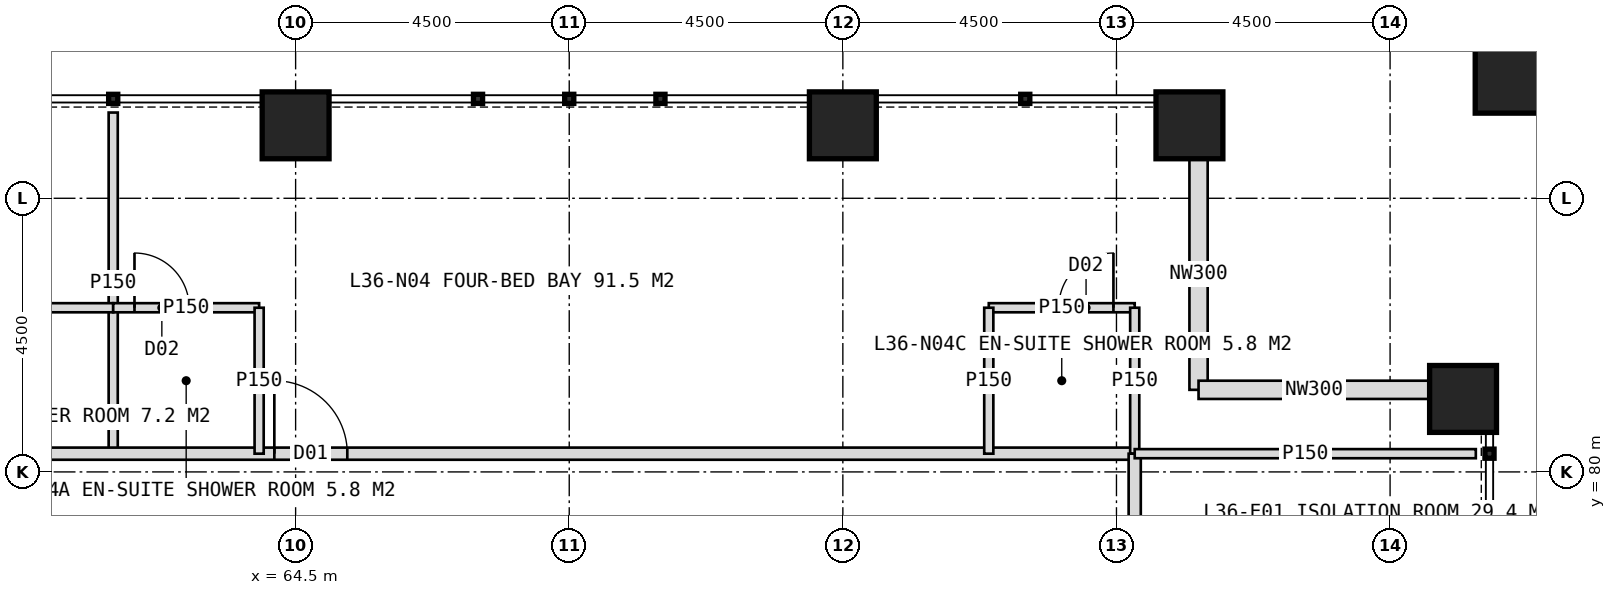
"""IFC4 building model, lengths in metres.
Left out: names, types, materials, properties, quantities, classifications, styles, units other than length and angle.
Written with IfcOpenShell. Run it as: python <this file> out.ifc"""

import sys

from ifc_helpers import new_model, si_unit, direction, frame, frame_2d, origin, origin_2d, place, context, subcontext, project, spatial, rectangle, hollow_rectangle, extrude, element, fill, save


model = new_model("IFC4")
c1 = context("Model", 3, precision=1e-05, world=origin(), true_north=direction((0.0, 1.0)))
c2 = subcontext(c1, "Body", "Model", "MODEL_VIEW")
j1 = project(units=[si_unit("LENGTHUNIT", "METRE"), si_unit("PLANEANGLEUNIT", "RADIAN")], contexts=[c1])
p1 = place(None, origin())
s1 = spatial("IfcSite", under=j1, at=p1, CompositionType="ELEMENT")
p2 = place(p1, origin())
s2 = spatial("IfcBuilding", under=s1, at=p2, CompositionType="ELEMENT")
p3 = place(p2, frame((0.0, 0.0, 152.0)))
s3 = spatial("IfcBuildingStorey", under=s2, at=p3, CompositionType="ELEMENT", Elevation=152.0)
for number, where, z_axis, x_axis in (
    (1, (64.5, 85.7, 0.0), (0.0, 0.0, 1.0), (1.0, 0.0, 0.0)),
    (2, (73.5, 85.7, 0.0), (0.0, 0.0, 1.0), (1.0, 0.0, 0.0)),
    (3, (79.2, 85.7, 0.0), (0.0, 0.0, 1.0), (1.0, 0.0, 0.0)),
    (4, (83.7, 81.2, 0.0), (0.0, 0.0, 1.0), (1.0, 0.0, 0.0)),
):
    element("IfcColumn", number, at=place(p3, frame(where, z_axis=z_axis, x_axis=x_axis)), inside=s3, PredefinedType="COLUMN", context=c2, shape_type="SweptSolid", body=[
        extrude(hollow_rectangle(XDim=1.1, YDim=1.1, WallThickness=0.1, at=origin_2d()), origin(), (0.0, 0.0, 1.0), 4.0),
    ])
p4 = place(p3, frame((84.6, 86.6, 0.0), z_axis=(0.0, 0.0, 1.0), x_axis=(1.0, 0.0, 0.0)))
e5 = element("IfcColumn", 5, at=p4, inside=s3, PredefinedType="COLUMN", context=c2, shape_type="SweptSolid", body=[
    extrude(hollow_rectangle(XDim=1.4, YDim=1.4, WallThickness=0.08, at=origin_2d()), origin(), (0.0, 0.0, 1.0), 4.0),
])
for number, where, z_axis, x_axis in (
    (6, (79.35, 85.15, 0.0), (0.0, 0.0, 1.0), (0.0, -1.0, 0.0)),
    (7, (79.35, 81.35, 0.0), (0.0, 0.0, 1.0), (1.0, 0.0, 0.0)),
):
    element("IfcWall", number, at=place(p3, frame(where, z_axis=z_axis, x_axis=x_axis)), inside=s3, PredefinedType="ELEMENTEDWALL", context=c2, shape_type="SweptSolid", body=[
        extrude(rectangle(XDim=3.8, YDim=0.3, at=frame_2d((1.9, 0.0))), origin(), (0.0, 0.0, 1.0), 4.0),
    ])
p5 = place(p3, frame((61.5, 80.3, 0.0), z_axis=(0.0, 0.0, 1.0), x_axis=(0.0, 1.0, 0.0)))
e8 = element("IfcWall", 8, at=p5, inside=s3, PredefinedType="PARTITIONING", context=c2, shape_type="SweptSolid", body=[
    extrude(rectangle(XDim=5.61, YDim=0.15, at=frame_2d((2.805, 0.0))), origin(), (0.0, 0.0, 1.0), 3.75),
])
p6 = place(p3, frame((41.7, 80.3, 0.0), z_axis=(0.0, 0.0, 1.0), x_axis=(1.0, 0.0, 0.0)))
e9 = element("IfcWall", 9, at=p6, inside=s3, PredefinedType="PARTITIONING", context=c2, shape_type="SweptSolid", body=[
    extrude(rectangle(XDim=36.6, YDim=0.2, at=frame_2d((18.3, 0.0))), origin(), (0.0, 0.0, 1.0), 3.75),
])
p7 = place(p6, frame((3.35, 0.0, 0.0)))
e10 = element("IfcOpeningElement", 10, at=p7, cuts=e9, PredefinedType="OPENING", context=c2, shape_type="SweptSolid", body=[
    extrude(rectangle(XDim=1.2, YDim=2.2, at=frame_2d((0.6, 1.1))), frame((0.0, 0.11, 0.0), z_axis=(0.0, -1.0, 0.0), x_axis=(1.0, 0.0, 0.0)), (0.0, 0.0, 1.0), 0.22),
])
p8 = place(p6, frame((8.8, 0.0, 0.0)))
e11 = element("IfcOpeningElement", 11, at=p8, cuts=e9, PredefinedType="OPENING", context=c2, shape_type="SweptSolid", body=[
    extrude(rectangle(XDim=1.0, YDim=2.1, at=frame_2d((0.5, 1.05))), frame((0.0, 0.11, 0.0), z_axis=(0.0, -1.0, 0.0), x_axis=(1.0, 0.0, 0.0)), (0.0, 0.0, 1.0), 0.22),
])
p9 = place(p6, frame((15.35, 0.0, 0.0)))
e12 = element("IfcOpeningElement", 12, at=p9, cuts=e9, PredefinedType="OPENING", context=c2, shape_type="SweptSolid", body=[
    extrude(rectangle(XDim=1.2, YDim=2.2, at=frame_2d((0.6, 1.1))), frame((0.0, 0.11, 0.0), z_axis=(0.0, -1.0, 0.0), x_axis=(1.0, 0.0, 0.0)), (0.0, 0.0, 1.0), 0.22),
])
p10 = place(p6, frame((22.45, 0.0, 0.0)))
e13 = element("IfcOpeningElement", 13, at=p10, cuts=e9, PredefinedType="OPENING", context=c2, shape_type="SweptSolid", body=[
    extrude(rectangle(XDim=1.2, YDim=2.2, at=frame_2d((0.6, 1.1))), frame((0.0, 0.11, 0.0), z_axis=(0.0, -1.0, 0.0), x_axis=(1.0, 0.0, 0.0)), (0.0, 0.0, 1.0), 0.22),
])
p11 = place(p3, frame((58.5, 82.7, 0.0), z_axis=(0.0, 0.0, 1.0), x_axis=(1.0, 0.0, 0.0)))
e14 = element("IfcWall", 14, at=p11, inside=s3, PredefinedType="PARTITIONING", context=c2, shape_type="SweptSolid", body=[
    extrude(rectangle(XDim=3.0, YDim=0.15, at=frame_2d((1.5, 0.0))), origin(), (0.0, 0.0, 1.0), 3.75),
])
p12 = place(p11, frame((0.35, 0.0, 0.0)))
e15 = element("IfcOpeningElement", 15, at=p12, cuts=e14, PredefinedType="OPENING", context=c2, shape_type="SweptSolid", body=[
    extrude(rectangle(XDim=0.9, YDim=2.1, at=frame_2d((0.45, 1.05))), frame((0.0, 0.085, 0.0), z_axis=(0.0, -1.0, 0.0), x_axis=(1.0, 0.0, 0.0)), (0.0, 0.0, 1.0), 0.17),
])
p13 = place(p3, frame((61.5, 82.7, 0.0), z_axis=(0.0, 0.0, 1.0), x_axis=(1.0, 0.0, 0.0)))
e16 = element("IfcWall", 16, at=p13, inside=s3, PredefinedType="PARTITIONING", context=c2, shape_type="SweptSolid", body=[
    extrude(rectangle(XDim=2.4, YDim=0.15, at=frame_2d((1.2, 0.0))), origin(), (0.0, 0.0, 1.0), 3.75),
])
p14 = place(p13, frame((0.35, 0.0, 0.0)))
e17 = element("IfcOpeningElement", 17, at=p14, cuts=e16, PredefinedType="OPENING", context=c2, shape_type="SweptSolid", body=[
    extrude(rectangle(XDim=0.9, YDim=2.1, at=frame_2d((0.45, 1.05))), frame((0.0, 0.085, 0.0), z_axis=(0.0, -1.0, 0.0), x_axis=(1.0, 0.0, 0.0)), (0.0, 0.0, 1.0), 0.17),
])
p15 = place(p3, frame((63.9, 80.3, 0.0), z_axis=(0.0, 0.0, 1.0), x_axis=(0.0, 1.0, 0.0)))
e18 = element("IfcWall", 18, at=p15, inside=s3, PredefinedType="PARTITIONING", context=c2, shape_type="SweptSolid", body=[
    extrude(rectangle(XDim=2.4, YDim=0.15, at=frame_2d((1.2, 0.0))), origin(), (0.0, 0.0, 1.0), 3.75),
])
p16 = place(p3, frame((75.9, 82.7, 0.0), z_axis=(0.0, 0.0, 1.0), x_axis=(1.0, 0.0, 0.0)))
e19 = element("IfcWall", 19, at=p16, inside=s3, PredefinedType="PARTITIONING", context=c2, shape_type="SweptSolid", body=[
    extrude(rectangle(XDim=2.4, YDim=0.15, at=frame_2d((1.2, 0.0))), origin(), (0.0, 0.0, 1.0), 3.75),
])
p17 = place(p16, frame((1.15, 0.0, 0.0)))
e20 = element("IfcOpeningElement", 20, at=p17, cuts=e19, PredefinedType="OPENING", context=c2, shape_type="SweptSolid", body=[
    extrude(rectangle(XDim=0.9, YDim=2.1, at=frame_2d((0.45, 1.05))), frame((0.0, 0.085, 0.0), z_axis=(0.0, -1.0, 0.0), x_axis=(1.0, 0.0, 0.0)), (0.0, 0.0, 1.0), 0.17),
])
for number, where, z_axis, x_axis in (
    (21, (75.9, 80.3, 0.0), (0.0, 0.0, 1.0), (0.0, 1.0, 0.0)),
    (22, (78.3, 80.3, 0.0), (0.0, 0.0, 1.0), (0.0, 1.0, 0.0)),
):
    element("IfcWall", number, at=place(p3, frame(where, z_axis=z_axis, x_axis=x_axis)), inside=s3, PredefinedType="PARTITIONING", context=c2, shape_type="SweptSolid", body=[
        extrude(rectangle(XDim=2.4, YDim=0.15, at=frame_2d((1.2, 0.0))), origin(), (0.0, 0.0, 1.0), 3.75),
    ])
p18 = place(p3, frame((78.3, 80.3, 0.0), z_axis=(0.0, 0.0, 1.0), x_axis=(0.0, -1.0, 0.0)))
e23 = element("IfcWall", 23, at=p18, inside=s3, PredefinedType="PARTITIONING", context=c2, shape_type="SweptSolid", body=[
    extrude(rectangle(XDim=36.6, YDim=0.2, at=frame_2d((18.3, 0.0))), origin(), (0.0, 0.0, 1.0), 3.75),
])
p19 = place(p18, frame((3.35, 0.0, 0.0)))
e24 = element("IfcOpeningElement", 24, at=p19, cuts=e23, PredefinedType="OPENING", context=c2, shape_type="SweptSolid", body=[
    extrude(rectangle(XDim=1.2, YDim=2.2, at=frame_2d((0.6, 1.1))), frame((0.0, 0.11, 0.0), z_axis=(0.0, -1.0, 0.0), x_axis=(1.0, 0.0, 0.0)), (0.0, 0.0, 1.0), 0.22),
])
p20 = place(p18, frame((11.05, 0.0, 0.0)))
e25 = element("IfcOpeningElement", 25, at=p20, cuts=e23, PredefinedType="OPENING", context=c2, shape_type="SweptSolid", body=[
    extrude(rectangle(XDim=1.2, YDim=2.2, at=frame_2d((0.6, 1.1))), frame((0.0, 0.11, 0.0), z_axis=(0.0, -1.0, 0.0), x_axis=(1.0, 0.0, 0.0)), (0.0, 0.0, 1.0), 0.22),
])
p21 = place(p18, frame((16.3, 0.0, 0.0)))
e26 = element("IfcOpeningElement", 26, at=p21, cuts=e23, PredefinedType="OPENING", context=c2, shape_type="SweptSolid", body=[
    extrude(rectangle(XDim=1.0, YDim=2.1, at=frame_2d((0.5, 1.05))), frame((0.0, 0.11, 0.0), z_axis=(0.0, -1.0, 0.0), x_axis=(1.0, 0.0, 0.0)), (0.0, 0.0, 1.0), 0.22),
])
p22 = place(p18, frame((21.55, 0.0, 0.0)))
e27 = element("IfcOpeningElement", 27, at=p22, cuts=e23, PredefinedType="OPENING", context=c2, shape_type="SweptSolid", body=[
    extrude(rectangle(XDim=1.2, YDim=2.2, at=frame_2d((0.6, 1.1))), frame((0.0, 0.11, 0.0), z_axis=(0.0, -1.0, 0.0), x_axis=(1.0, 0.0, 0.0)), (0.0, 0.0, 1.0), 0.22),
])
p23 = place(p18, frame((32.75, 0.0, 0.0)))
e28 = element("IfcOpeningElement", 28, at=p23, cuts=e23, PredefinedType="OPENING", context=c2, shape_type="SweptSolid", body=[
    extrude(rectangle(XDim=1.2, YDim=2.2, at=frame_2d((0.6, 1.1))), frame((0.0, 0.11, 0.0), z_axis=(0.0, -1.0, 0.0), x_axis=(1.0, 0.0, 0.0)), (0.0, 0.0, 1.0), 0.22),
])
p24 = place(p3, frame((78.3, 80.3, 0.0), z_axis=(0.0, 0.0, 1.0), x_axis=(1.0, 0.0, 0.0)))
e29 = element("IfcWall", 29, at=p24, inside=s3, PredefinedType="PARTITIONING", context=c2, shape_type="SweptSolid", body=[
    extrude(rectangle(XDim=5.61, YDim=0.15, at=frame_2d((2.805, 0.0))), origin(), (0.0, 0.0, 1.0), 3.75),
])
p25 = place(p10, origin())
e30 = element("IfcDoor", 30, at=p25, inside=s3, OperationType="SINGLE_SWING_LEFT", PredefinedType="DOOR", context=c2, shape_type="SweptSolid", body=[
    extrude(rectangle(XDim=1.2, YDim=2.2, at=frame_2d((0.6, 1.1))), frame((0.0, 0.025, 0.0), z_axis=(0.0, -1.0, 0.0), x_axis=(1.0, 0.0, 0.0)), (0.0, 0.0, 1.0), 0.05),
])
fill(e13, e30)
p26 = place(p14, origin())
e31 = element("IfcDoor", 31, at=p26, inside=s3, OperationType="SINGLE_SWING_LEFT", PredefinedType="DOOR", context=c2, shape_type="SweptSolid", body=[
    extrude(rectangle(XDim=0.9, YDim=2.1, at=frame_2d((0.45, 1.05))), frame((0.0, 0.025, 0.0), z_axis=(0.0, -1.0, 0.0), x_axis=(1.0, 0.0, 0.0)), (0.0, 0.0, 1.0), 0.05),
])
fill(e17, e31)
p27 = place(p17, origin())
e32 = element("IfcDoor", 32, at=p27, inside=s3, OperationType="SINGLE_SWING_RIGHT", PredefinedType="DOOR", context=c2, shape_type="SweptSolid", body=[
    extrude(rectangle(XDim=0.9, YDim=2.1, at=frame_2d((0.45, 1.05))), frame((0.0, 0.025, 0.0), z_axis=(0.0, -1.0, 0.0), x_axis=(1.0, 0.0, 0.0)), (0.0, 0.0, 1.0), 0.05),
])
fill(e20, e32)
save(model, sys.argv[1])
